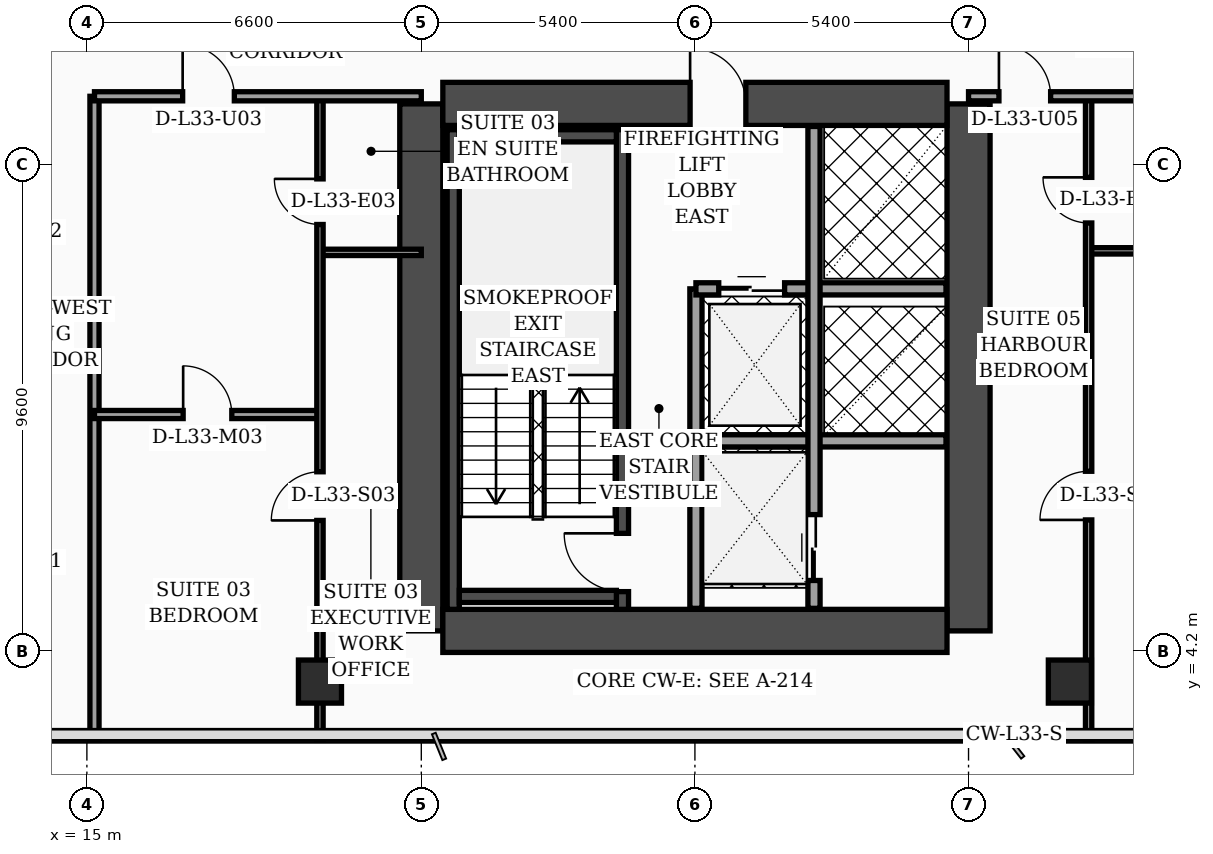
"""IFC4 building model, lengths in metres.
Left out: names, types, materials, properties, quantities, classifications, styles, units other than length and angle.
Written with IfcOpenShell. Run it as: python <this file> out.ifc"""

import sys

from ifc_helpers import new_model, si_unit, direction, frame, frame_2d, origin, origin_2d, place, context, subcontext, project, spatial, rectangle, hollow_rectangle, extrude, element, fill, save


model = new_model("IFC4")
c1 = context("Model", 3, precision=1e-05, world=origin(), true_north=direction((0.0, 1.0)))
c2 = subcontext(c1, "Body", "Model", "MODEL_VIEW")
j1 = project(units=[si_unit("LENGTHUNIT", "METRE"), si_unit("PLANEANGLEUNIT", "RADIAN")], contexts=[c1])
p1 = place(None, origin())
s1 = spatial("IfcSite", under=j1, at=p1, CompositionType="ELEMENT")
p2 = place(p1, origin())
s2 = spatial("IfcBuilding", under=s1, at=p2, CompositionType="ELEMENT")
p3 = place(p2, frame((0.0, 0.0, 135.4)))
s3 = spatial("IfcBuildingStorey", under=s2, at=p3, CompositionType="ELEMENT", Elevation=135.4)
for number, where, z_axis, x_axis in (
    (1, (21.6, 4.6, 0.0), (0.0, 0.0, 1.0), (0.0, 1.0, 0.0)),
    (2, (32.4, 4.6, 0.0), (0.0, 0.0, 1.0), (0.0, 1.0, 0.0)),
):
    element("IfcWall", number, at=place(p3, frame(where, z_axis=z_axis, x_axis=x_axis)), inside=s3, PredefinedType="SHEAR", context=c2, shape_type="SweptSolid", body=[
        extrude(rectangle(XDim=10.4, YDim=0.85, at=frame_2d((5.2, 0.0))), origin(), (0.0, 0.0, 1.0), 3.52),
    ])
p4 = place(p3, frame((22.025, 15.0, 0.0), z_axis=(0.0, 0.0, 1.0), x_axis=(1.0, 0.0, 0.0)))
e3 = element("IfcWall", 3, at=p4, inside=s3, PredefinedType="SHEAR", context=c2, shape_type="SweptSolid", body=[
    extrude(rectangle(XDim=9.95, YDim=0.85, at=frame_2d((4.975, 0.0))), origin(), (0.0, 0.0, 1.0), 3.52),
])
p5 = place(p4, frame((4.88, 0.0, 0.0)))
e4 = element("IfcOpeningElement", 4, at=p5, cuts=e3, PredefinedType="OPENING", context=c2, shape_type="SweptSolid", body=[
    extrude(rectangle(XDim=1.1, YDim=2.2, at=frame_2d((0.55, 1.1))), frame((0.0, 0.435, 0.0), z_axis=(0.0, -1.0, 0.0), x_axis=(1.0, 0.0, 0.0)), (0.0, 0.0, 1.0), 0.87),
])
p6 = place(p3, frame((22.025, 4.6, 0.0), z_axis=(0.0, 0.0, 1.0), x_axis=(1.0, 0.0, 0.0)))
e5 = element("IfcWall", 5, at=p6, inside=s3, PredefinedType="SHEAR", context=c2, shape_type="SweptSolid", body=[
    extrude(rectangle(XDim=9.95, YDim=0.85, at=frame_2d((4.975, 0.0))), origin(), (0.0, 0.0, 1.0), 3.52),
])
p7 = place(p3, frame((22.23, 5.025, 0.0), z_axis=(0.0, 0.0, 1.0), x_axis=(0.0, 1.0, 0.0)))
e6 = element("IfcWall", 6, at=p7, inside=s3, PredefinedType="SOLIDWALL", context=c2, shape_type="SweptSolid", body=[
    extrude(rectangle(XDim=9.465, YDim=0.24, at=frame_2d((4.732, 0.0))), origin(), (0.0, 0.0, 1.0), 3.52),
])
p8 = place(p3, frame((25.57, 5.025, 0.0), z_axis=(0.0, 0.0, 1.0), x_axis=(0.0, 1.0, 0.0)))
e7 = element("IfcWall", 7, at=p8, inside=s3, PredefinedType="SOLIDWALL", context=c2, shape_type="SweptSolid", body=[
    extrude(rectangle(XDim=9.465, YDim=0.24, at=frame_2d((4.732, 0.0))), origin(), (0.0, 0.0, 1.0), 3.52),
])
p9 = place(p8, frame((0.35, 0.0, 0.0)))
e8 = element("IfcOpeningElement", 8, at=p9, cuts=e7, PredefinedType="OPENING", context=c2, shape_type="SweptSolid", body=[
    extrude(rectangle(XDim=1.15, YDim=2.2, at=frame_2d((0.575, 1.1))), frame((0.0, 0.13, 0.0), z_axis=(0.0, -1.0, 0.0), x_axis=(1.0, 0.0, 0.0)), (0.0, 0.0, 1.0), 0.26),
])
for number, where, z_axis, x_axis in (
    (9, (22.35, 5.28, 0.0), (0.0, 0.0, 1.0), (1.0, 0.0, 0.0)),
    (10, (22.35, 14.37, 0.0), (0.0, 0.0, 1.0), (1.0, 0.0, 0.0)),
):
    element("IfcWall", number, at=place(p3, frame(where, z_axis=z_axis, x_axis=x_axis)), inside=s3, PredefinedType="SOLIDWALL", context=c2, shape_type="SweptSolid", body=[
        extrude(rectangle(XDim=3.1, YDim=0.24, at=frame_2d((1.55, 0.0))), origin(), (0.0, 0.0, 1.0), 3.52),
    ])
for number, where, z_axis, x_axis in (
    (11, (19.6, 3.6, 0.0), (0.0, 0.0, 1.0), (1.0, 0.0, 0.0)),
    (12, (34.4, 3.6, 0.0), (0.0, 0.0, 1.0), (1.0, 0.0, 0.0)),
):
    element("IfcColumn", number, at=place(p3, frame(where, z_axis=z_axis, x_axis=x_axis)), inside=s3, PredefinedType="COLUMN", context=c2, shape_type="SweptSolid", body=[
        extrude(hollow_rectangle(XDim=0.85, YDim=0.85, WallThickness=0.036, at=origin_2d()), origin(), (0.0, 0.0, 1.0), 3.52),
    ])
p10 = place(p3, frame((27.02, 5.045, 0.0), z_axis=(0.0, 0.0, 1.0), x_axis=(0.0, 1.0, 0.0)))
e13 = element("IfcWall", 13, at=p10, inside=s3, PredefinedType="SOLIDWALL", context=c2, shape_type="SweptSolid", body=[
    extrude(rectangle(XDim=6.305, YDim=0.24, at=frame_2d((3.153, 0.0))), origin(), (0.0, 0.0, 1.0), 3.52),
])
p11 = place(p3, frame((27.02, 11.35, 0.0), z_axis=(0.0, 0.0, 1.0), x_axis=(1.0, 0.0, 0.0)))
e14 = element("IfcWall", 14, at=p11, inside=s3, PredefinedType="SOLIDWALL", context=c2, shape_type="SweptSolid", body=[
    extrude(rectangle(XDim=4.935, YDim=0.24, at=frame_2d((2.468, 0.0))), origin(), (0.0, 0.0, 1.0), 3.52),
])
p12 = place(p11, frame((0.45, 0.0, 0.0)))
e15 = element("IfcOpeningElement", 15, at=p12, cuts=e14, PredefinedType="OPENING", context=c2, shape_type="SweptSolid", body=[
    extrude(rectangle(XDim=1.3, YDim=2.35, at=frame_2d((0.65, 1.175))), frame((0.0, 0.13, 0.0), z_axis=(0.0, -1.0, 0.0), x_axis=(1.0, 0.0, 0.0)), (0.0, 0.0, 1.0), 0.26),
])
p13 = place(p3, frame((27.02, 8.35, 0.0), z_axis=(0.0, 0.0, 1.0), x_axis=(1.0, 0.0, 0.0)))
e16 = element("IfcWall", 16, at=p13, inside=s3, PredefinedType="SOLIDWALL", context=c2, shape_type="SweptSolid", body=[
    extrude(rectangle(XDim=4.935, YDim=0.24, at=frame_2d((2.468, 0.0))), origin(), (0.0, 0.0, 1.0), 3.52),
])
p14 = place(p3, frame((29.35, 5.045, 0.0), z_axis=(0.0, 0.0, 1.0), x_axis=(0.0, 1.0, 0.0)))
e17 = element("IfcWall", 17, at=p14, inside=s3, PredefinedType="SOLIDWALL", context=c2, shape_type="SweptSolid", body=[
    extrude(rectangle(XDim=9.51, YDim=0.24, at=frame_2d((4.755, 0.0))), origin(), (0.0, 0.0, 1.0), 3.52),
])
p15 = place(p14, frame((0.55, 0.0, 0.0)))
e18 = element("IfcOpeningElement", 18, at=p15, cuts=e17, PredefinedType="OPENING", context=c2, shape_type="SweptSolid", body=[
    extrude(rectangle(XDim=1.3, YDim=2.35, at=frame_2d((0.65, 1.175))), frame((0.0, 0.13, 0.0), z_axis=(0.0, -1.0, 0.0), x_axis=(1.0, 0.0, 0.0)), (0.0, 0.0, 1.0), 0.26),
])
p16 = place(p3, frame((15.15, 2.44, 0.0), z_axis=(0.0, 0.0, 1.0), x_axis=(0.0, 1.0, 0.0)))
e19 = element("IfcWall", 19, at=p16, inside=s3, PredefinedType="PARTITIONING", context=c2, shape_type="SweptSolid", body=[
    extrude(rectangle(XDim=12.71, YDim=0.18, at=frame_2d((6.355, 0.0))), origin(), (0.0, 0.0, 1.0), 3.02),
])
p17 = place(p3, frame((19.6, 12.07, 0.0), z_axis=(0.0, 0.0, 1.0), x_axis=(1.0, 0.0, 0.0)))
e20 = element("IfcWall", 20, at=p17, inside=s3, PredefinedType="PARTITIONING", context=c2, shape_type="SweptSolid", body=[
    extrude(rectangle(XDim=2.0, YDim=0.125, at=frame_2d((1.0, 0.0))), origin(), (0.0, 0.0, 1.0), 3.52),
])
p18 = place(p3, frame((15.15, 8.87, 0.0), z_axis=(0.0, 0.0, 1.0), x_axis=(1.0, 0.0, 0.0)))
e21 = element("IfcWall", 21, at=p18, inside=s3, PredefinedType="PARTITIONING", context=c2, shape_type="SweptSolid", body=[
    extrude(rectangle(XDim=4.45, YDim=0.16, at=frame_2d((2.225, 0.0))), origin(), (0.0, 0.0, 1.0), 3.52),
])
p19 = place(p18, frame((1.75, 0.0, 0.0)))
e22 = element("IfcOpeningElement", 22, at=p19, cuts=e21, PredefinedType="OPENING", context=c2, shape_type="SweptSolid", body=[
    extrude(rectangle(XDim=0.96, YDim=2.2, at=frame_2d((0.48, 1.1))), frame((0.0, 0.09, 0.0), z_axis=(0.0, -1.0, 0.0), x_axis=(1.0, 0.0, 0.0)), (0.0, 0.0, 1.0), 0.18),
])
p20 = place(p3, frame((19.6, 2.44, 0.0), z_axis=(0.0, 0.0, 1.0), x_axis=(0.0, 1.0, 0.0)))
e23 = element("IfcWall", 23, at=p20, inside=s3, PredefinedType="PARTITIONING", context=c2, shape_type="SweptSolid", body=[
    extrude(rectangle(XDim=12.71, YDim=0.125, at=frame_2d((6.355, 0.0))), origin(), (0.0, 0.0, 1.0), 2.47),
])
p21 = place(p20, frame((4.34, 0.0, 0.0)))
e24 = element("IfcOpeningElement", 24, at=p21, cuts=e23, PredefinedType="OPENING", context=c2, shape_type="SweptSolid", body=[
    extrude(rectangle(XDim=0.96, YDim=2.2, at=frame_2d((0.48, 1.1))), frame((0.0, 0.073, 0.0), z_axis=(0.0, -1.0, 0.0), x_axis=(1.0, 0.0, 0.0)), (0.0, 0.0, 1.0), 0.145),
])
p22 = place(p20, frame((10.18, 0.0, 0.0)))
e25 = element("IfcOpeningElement", 25, at=p22, cuts=e23, PredefinedType="OPENING", context=c2, shape_type="SweptSolid", body=[
    extrude(rectangle(XDim=0.9, YDim=2.15, at=frame_2d((0.45, 1.075))), frame((0.0, 0.073, 0.0), z_axis=(0.0, -1.0, 0.0), x_axis=(1.0, 0.0, 0.0)), (0.0, 0.0, 1.0), 0.145),
])
p23 = place(p3, frame((15.15, 15.15, 0.0), z_axis=(0.0, 0.0, 1.0), x_axis=(1.0, 0.0, 0.0)))
e26 = element("IfcWall", 26, at=p23, inside=s3, PredefinedType="PARTITIONING", context=c2, shape_type="SweptSolid", body=[
    extrude(rectangle(XDim=6.45, YDim=0.18, at=frame_2d((3.225, 0.0))), origin(), (0.0, 0.0, 1.0), 2.47),
])
p24 = place(p23, frame((1.74, 0.0, 0.0)))
e27 = element("IfcOpeningElement", 27, at=p24, cuts=e26, PredefinedType="OPENING", context=c2, shape_type="SweptSolid", body=[
    extrude(rectangle(XDim=1.02, YDim=2.2, at=frame_2d((0.51, 1.1))), frame((0.0, 0.1, 0.0), z_axis=(0.0, -1.0, 0.0), x_axis=(1.0, 0.0, 0.0)), (0.0, 0.0, 1.0), 0.2),
])
p25 = place(p3, frame((34.77, 12.1, 0.0), z_axis=(0.0, 0.0, 1.0), x_axis=(1.0, 0.0, 0.0)))
e28 = element("IfcWall", 28, at=p25, inside=s3, PredefinedType="PARTITIONING", context=c2, shape_type="SweptSolid", body=[
    extrude(rectangle(XDim=1.93, YDim=0.125, at=frame_2d((0.965, 0.0))), origin(), (0.0, 0.0, 1.0), 2.82),
])
p26 = place(p3, frame((34.77, 2.44, 0.0), z_axis=(0.0, 0.0, 1.0), x_axis=(0.0, 1.0, 0.0)))
e29 = element("IfcWall", 29, at=p26, inside=s3, PredefinedType="PARTITIONING", context=c2, shape_type="SweptSolid", body=[
    extrude(rectangle(XDim=12.71, YDim=0.125, at=frame_2d((6.355, 0.0))), origin(), (0.0, 0.0, 1.0), 2.82),
])
p27 = place(p26, frame((4.35, 0.0, 0.0)))
e30 = element("IfcOpeningElement", 30, at=p27, cuts=e29, PredefinedType="OPENING", context=c2, shape_type="SweptSolid", body=[
    extrude(rectangle(XDim=0.96, YDim=2.2, at=frame_2d((0.48, 1.1))), frame((0.0, 0.073, 0.0), z_axis=(0.0, -1.0, 0.0), x_axis=(1.0, 0.0, 0.0)), (0.0, 0.0, 1.0), 0.145),
])
p28 = place(p26, frame((10.21, 0.0, 0.0)))
e31 = element("IfcOpeningElement", 31, at=p28, cuts=e29, PredefinedType="OPENING", context=c2, shape_type="SweptSolid", body=[
    extrude(rectangle(XDim=0.9, YDim=2.15, at=frame_2d((0.45, 1.075))), frame((0.0, 0.073, 0.0), z_axis=(0.0, -1.0, 0.0), x_axis=(1.0, 0.0, 0.0)), (0.0, 0.0, 1.0), 0.145),
])
p29 = place(p3, frame((32.4, 15.15, 0.0), z_axis=(0.0, 0.0, 1.0), x_axis=(1.0, 0.0, 0.0)))
e32 = element("IfcWall", 32, at=p29, inside=s3, PredefinedType="PARTITIONING", context=c2, shape_type="SweptSolid", body=[
    extrude(rectangle(XDim=18.9, YDim=0.18, at=frame_2d((9.45, 0.0))), origin(), (0.0, 0.0, 1.0), 2.82),
])
p30 = place(p29, frame((0.6, 0.0, 0.0)))
e33 = element("IfcOpeningElement", 33, at=p30, cuts=e32, PredefinedType="OPENING", context=c2, shape_type="SweptSolid", body=[
    extrude(rectangle(XDim=1.02, YDim=2.2, at=frame_2d((0.51, 1.1))), frame((0.0, 0.1, 0.0), z_axis=(0.0, -1.0, 0.0), x_axis=(1.0, 0.0, 0.0)), (0.0, 0.0, 1.0), 0.2),
])
p31 = place(p29, frame((5.45, 0.0, 0.0)))
e34 = element("IfcOpeningElement", 34, at=p31, cuts=e32, PredefinedType="OPENING", context=c2, shape_type="SweptSolid", body=[
    extrude(rectangle(XDim=1.02, YDim=2.2, at=frame_2d((0.51, 1.1))), frame((0.0, 0.1, 0.0), z_axis=(0.0, -1.0, 0.0), x_axis=(1.0, 0.0, 0.0)), (0.0, 0.0, 1.0), 0.2),
])
p32 = place(p29, frame((10.41, 0.0, 0.0)))
e35 = element("IfcOpeningElement", 35, at=p32, cuts=e32, PredefinedType="OPENING", context=c2, shape_type="SweptSolid", body=[
    extrude(rectangle(XDim=1.02, YDim=2.2, at=frame_2d((0.51, 1.1))), frame((0.0, 0.1, 0.0), z_axis=(0.0, -1.0, 0.0), x_axis=(1.0, 0.0, 0.0)), (0.0, 0.0, 1.0), 0.2),
])
p33 = place(p29, frame((15.08, 0.0, 0.0)))
e36 = element("IfcOpeningElement", 36, at=p33, cuts=e32, PredefinedType="OPENING", context=c2, shape_type="SweptSolid", body=[
    extrude(rectangle(XDim=1.02, YDim=2.2, at=frame_2d((0.51, 1.1))), frame((0.0, 0.1, 0.0), z_axis=(0.0, -1.0, 0.0), x_axis=(1.0, 0.0, 0.0)), (0.0, 0.0, 1.0), 0.2),
])
p34 = place(p12, origin())
e37 = element("IfcDoor", 37, at=p34, inside=s3, OperationType="DOUBLE_DOOR_SLIDING", PredefinedType="DOOR", context=c2, shape_type="SweptSolid", body=[
    extrude(rectangle(XDim=1.3, YDim=2.35, at=frame_2d((0.65, 1.175))), frame((0.0, 0.025, 0.0), z_axis=(0.0, -1.0, 0.0), x_axis=(1.0, 0.0, 0.0)), (0.0, 0.0, 1.0), 0.05),
])
fill(e15, e37)
p35 = place(p15, origin())
e38 = element("IfcDoor", 38, at=p35, inside=s3, OperationType="DOUBLE_DOOR_SLIDING", PredefinedType="DOOR", context=c2, shape_type="SweptSolid", body=[
    extrude(rectangle(XDim=1.3, YDim=2.35, at=frame_2d((0.65, 1.175))), frame((0.0, 0.025, 0.0), z_axis=(0.0, -1.0, 0.0), x_axis=(1.0, 0.0, 0.0)), (0.0, 0.0, 1.0), 0.05),
])
fill(e18, e38)
p36 = place(p19, origin())
e39 = element("IfcDoor", 39, at=p36, inside=s3, OperationType="SINGLE_SWING_LEFT", PredefinedType="DOOR", context=c2, shape_type="SweptSolid", body=[
    extrude(rectangle(XDim=0.96, YDim=2.2, at=frame_2d((0.48, 1.1))), frame((0.0, 0.025, 0.0), z_axis=(0.0, -1.0, 0.0), x_axis=(1.0, 0.0, 0.0)), (0.0, 0.0, 1.0), 0.05),
])
fill(e22, e39)
p37 = place(p21, origin())
e40 = element("IfcDoor", 40, at=p37, inside=s3, OperationType="SINGLE_SWING_LEFT", PredefinedType="DOOR", context=c2, shape_type="SweptSolid", body=[
    extrude(rectangle(XDim=0.96, YDim=2.2, at=frame_2d((0.48, 1.1))), frame((0.0, 0.025, 0.0), z_axis=(0.0, -1.0, 0.0), x_axis=(1.0, 0.0, 0.0)), (0.0, 0.0, 1.0), 0.05),
])
fill(e24, e40)
p38 = place(p22, origin())
e41 = element("IfcDoor", 41, at=p38, inside=s3, OperationType="SINGLE_SWING_RIGHT", PredefinedType="DOOR", context=c2, shape_type="SweptSolid", body=[
    extrude(rectangle(XDim=0.9, YDim=2.15, at=frame_2d((0.45, 1.075))), frame((0.0, 0.025, 0.0), z_axis=(0.0, -1.0, 0.0), x_axis=(1.0, 0.0, 0.0)), (0.0, 0.0, 1.0), 0.05),
])
fill(e25, e41)
p39 = place(p24, origin())
e42 = element("IfcDoor", 42, at=p39, inside=s3, OperationType="SINGLE_SWING_LEFT", PredefinedType="DOOR", context=c2, shape_type="SweptSolid", body=[
    extrude(rectangle(XDim=1.02, YDim=2.2, at=frame_2d((0.51, 1.1))), frame((0.0, 0.025, 0.0), z_axis=(0.0, -1.0, 0.0), x_axis=(1.0, 0.0, 0.0)), (0.0, 0.0, 1.0), 0.05),
])
fill(e27, e42)
p40 = place(p27, origin())
e43 = element("IfcDoor", 43, at=p40, inside=s3, OperationType="SINGLE_SWING_LEFT", PredefinedType="DOOR", context=c2, shape_type="SweptSolid", body=[
    extrude(rectangle(XDim=0.96, YDim=2.2, at=frame_2d((0.48, 1.1))), frame((0.0, 0.025, 0.0), z_axis=(0.0, -1.0, 0.0), x_axis=(1.0, 0.0, 0.0)), (0.0, 0.0, 1.0), 0.05),
])
fill(e30, e43)
p41 = place(p28, origin())
e44 = element("IfcDoor", 44, at=p41, inside=s3, OperationType="SINGLE_SWING_RIGHT", PredefinedType="DOOR", context=c2, shape_type="SweptSolid", body=[
    extrude(rectangle(XDim=0.9, YDim=2.15, at=frame_2d((0.45, 1.075))), frame((0.0, 0.025, 0.0), z_axis=(0.0, -1.0, 0.0), x_axis=(1.0, 0.0, 0.0)), (0.0, 0.0, 1.0), 0.05),
])
fill(e31, e44)
p42 = place(p30, origin())
e45 = element("IfcDoor", 45, at=p42, inside=s3, OperationType="SINGLE_SWING_LEFT", PredefinedType="DOOR", context=c2, shape_type="SweptSolid", body=[
    extrude(rectangle(XDim=1.02, YDim=2.2, at=frame_2d((0.51, 1.1))), frame((0.0, 0.025, 0.0), z_axis=(0.0, -1.0, 0.0), x_axis=(1.0, 0.0, 0.0)), (0.0, 0.0, 1.0), 0.05),
])
fill(e33, e45)
p43 = place(p9, origin())
e46 = element("IfcDoor", 46, at=p43, inside=s3, OperationType="SINGLE_SWING_RIGHT", PredefinedType="DOOR", context=c2, shape_type="SweptSolid", body=[
    extrude(rectangle(XDim=1.15, YDim=2.2, at=frame_2d((0.575, 1.1))), frame((0.0, 0.025, 0.0), z_axis=(0.0, -1.0, 0.0), x_axis=(1.0, 0.0, 0.0)), (0.0, 0.0, 1.0), 0.05),
])
fill(e8, e46)
p44 = place(p5, origin())
e47 = element("IfcDoor", 47, at=p44, inside=s3, OperationType="SINGLE_SWING_LEFT", PredefinedType="DOOR", context=c2, shape_type="SweptSolid", body=[
    extrude(rectangle(XDim=1.1, YDim=2.2, at=frame_2d((0.55, 1.1))), frame((0.0, 0.025, 0.0), z_axis=(0.0, -1.0, 0.0), x_axis=(1.0, 0.0, 0.0)), (0.0, 0.0, 1.0), 0.05),
])
fill(e4, e47)
save(model, sys.argv[1])
